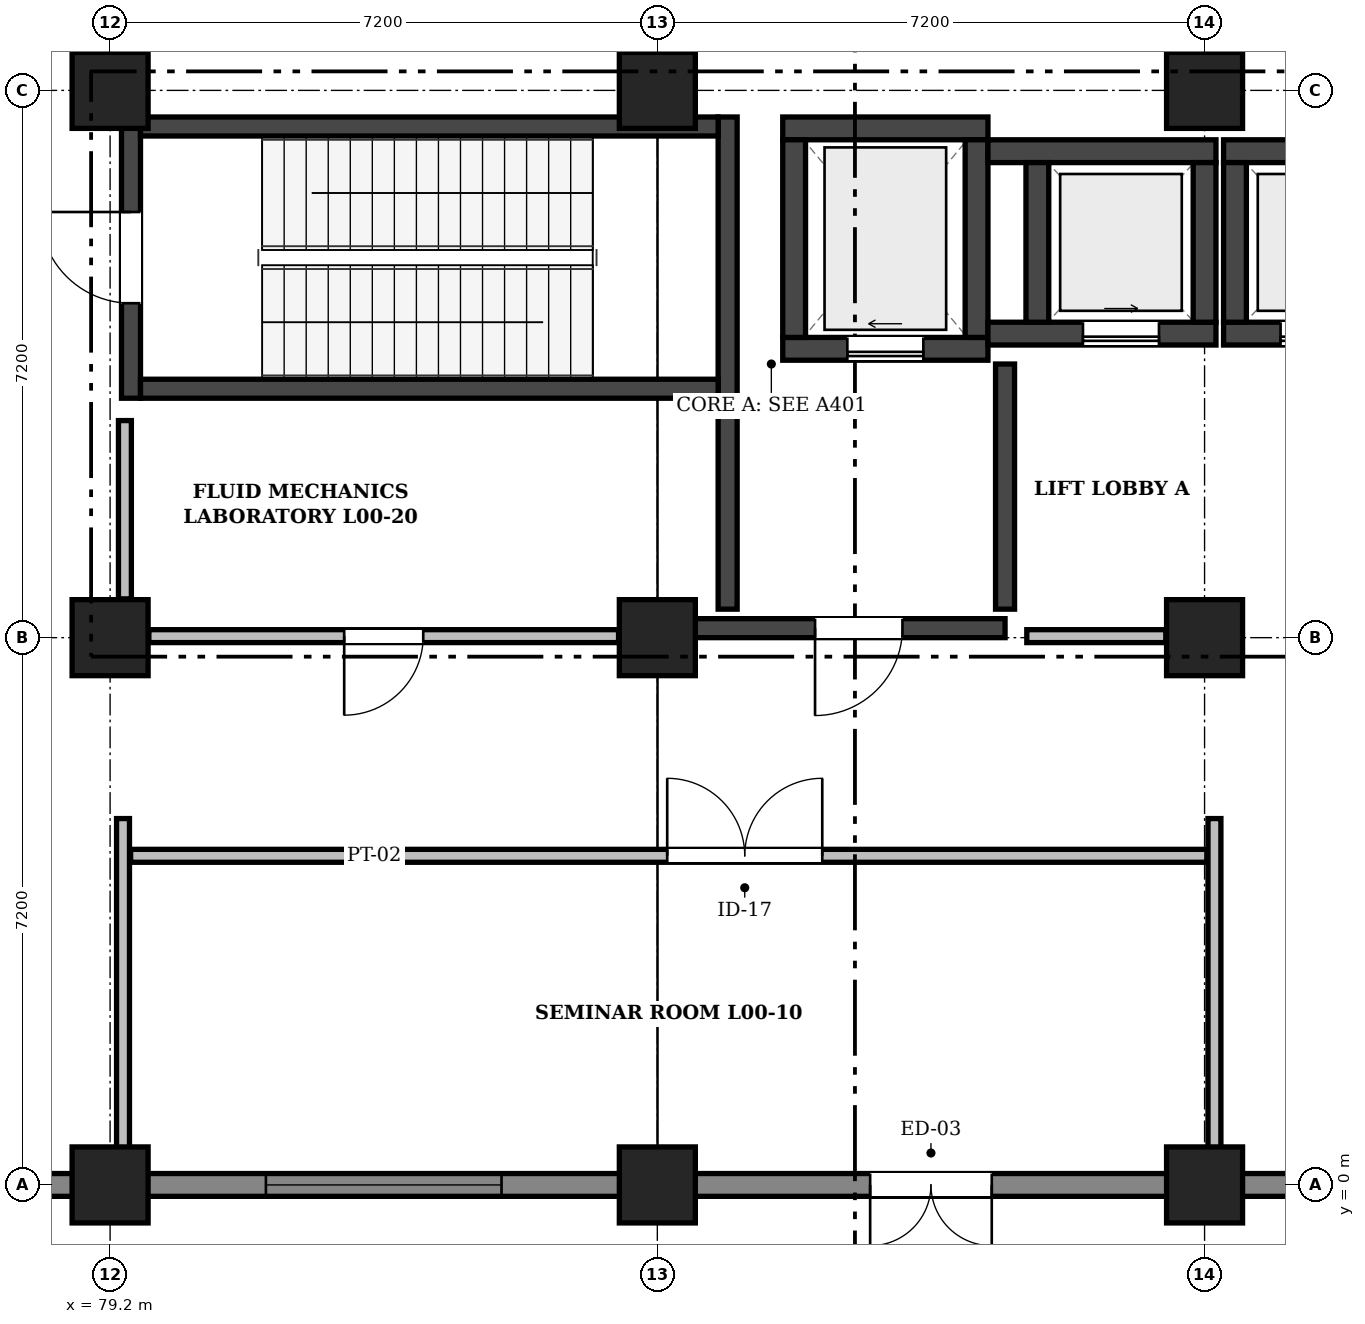
"""IFC4 building model, lengths in metres.
Left out: names, types, materials, properties, quantities, classifications, styles, units other than length and angle.
Written with IfcOpenShell. Run it as: python <this file> out.ifc"""

import sys

from ifc_helpers import new_model, si_unit, direction, frame, frame_2d, origin, origin_2d, place, context, subcontext, project, spatial, rectangle, extrude, element, fill, save


model = new_model("IFC4")
c1 = context("Model", 3, precision=1e-05, world=origin(), true_north=direction((0.0, 1.0)))
c2 = subcontext(c1, "Body", "Model", "MODEL_VIEW")
j1 = project(units=[si_unit("LENGTHUNIT", "METRE"), si_unit("PLANEANGLEUNIT", "RADIAN")], contexts=[c1])
p1 = place(None, origin())
s1 = spatial("IfcSite", under=j1, at=p1, CompositionType="ELEMENT")
p2 = place(p1, origin())
s2 = spatial("IfcBuilding", under=s1, at=p2, CompositionType="ELEMENT")
p3 = place(p2, origin())
s3 = spatial("IfcBuildingStorey", under=s2, at=p3, CompositionType="ELEMENT", Elevation=0.0)
for number, where, z_axis, x_axis in (
    (1, (79.2, 0.0, 0.0), (0.0, 0.0, 1.0), (1.0, 0.0, 0.0)),
    (2, (79.2, 7.2, 0.0), (0.0, 0.0, 1.0), (1.0, 0.0, 0.0)),
    (3, (79.2, 14.4, 0.0), (0.0, 0.0, 1.0), (1.0, 0.0, 0.0)),
    (4, (86.4, 0.0, 0.0), (0.0, 0.0, 1.0), (1.0, 0.0, 0.0)),
    (5, (86.4, 7.2, 0.0), (0.0, 0.0, 1.0), (1.0, 0.0, 0.0)),
    (6, (86.4, 14.4, 0.0), (0.0, 0.0, 1.0), (1.0, 0.0, 0.0)),
    (7, (93.6, 0.0, 0.0), (0.0, 0.0, 1.0), (1.0, 0.0, 0.0)),
    (8, (93.6, 7.2, 0.0), (0.0, 0.0, 1.0), (1.0, 0.0, 0.0)),
    (9, (93.6, 14.4, 0.0), (0.0, 0.0, 1.0), (1.0, 0.0, 0.0)),
):
    element("IfcColumn", number, at=place(p3, frame(where, z_axis=z_axis, x_axis=x_axis)), inside=s3, PredefinedType="COLUMN", context=c2, shape_type="SweptSolid", body=[
        extrude(rectangle(XDim=1.0, YDim=1.0, at=origin_2d()), origin(), (0.0, 0.0, 1.0), 4.8),
    ])
p4 = place(p3, frame((100.8, 0.0, 0.0), z_axis=(0.0, 0.0, 1.0), x_axis=(-1.0, 0.0, 0.0)))
e10 = element("IfcWall", 10, at=p4, inside=s3, PredefinedType="SOLIDWALL", context=c2, shape_type="SweptSolid", body=[
    extrude(rectangle(XDim=7.2, YDim=0.3, at=frame_2d((3.6, 0.0))), origin(), (0.0, 0.0, 1.0), 4.52),
])
p5 = place(p4, frame((2.8, 0.0, 0.0)))
e11 = element("IfcOpeningElement", 11, at=p5, cuts=e10, PredefinedType="OPENING", context=c2, shape_type="SweptSolid", body=[
    extrude(rectangle(XDim=1.6, YDim=2.2, at=frame_2d((0.8, 1.1))), frame((0.0, 0.162, 0.0), z_axis=(0.0, -1.0, 0.0), x_axis=(1.0, 0.0, 0.0)), (0.0, 0.0, 1.0), 0.324),
])
p6 = place(p3, frame((93.6, 0.0, 0.0), z_axis=(0.0, 0.0, 1.0), x_axis=(-1.0, 0.0, 0.0)))
e12 = element("IfcWall", 12, at=p6, inside=s3, PredefinedType="SOLIDWALL", context=c2, shape_type="SweptSolid", body=[
    extrude(rectangle(XDim=7.2, YDim=0.3, at=frame_2d((3.6, 0.0))), origin(), (0.0, 0.0, 1.0), 4.52),
])
p7 = place(p6, frame((2.8, 0.0, 0.0)))
e13 = element("IfcOpeningElement", 13, at=p7, cuts=e12, PredefinedType="OPENING", context=c2, shape_type="SweptSolid", body=[
    extrude(rectangle(XDim=1.6, YDim=2.2, at=frame_2d((0.8, 1.1))), frame((0.0, 0.162, 0.0), z_axis=(0.0, -1.0, 0.0), x_axis=(1.0, 0.0, 0.0)), (0.0, 0.0, 1.0), 0.324),
])
p8 = place(p3, frame((86.4, 0.0, 0.0), z_axis=(0.0, 0.0, 1.0), x_axis=(-1.0, 0.0, 0.0)))
e14 = element("IfcWall", 14, at=p8, inside=s3, PredefinedType="SOLIDWALL", context=c2, shape_type="SweptSolid", body=[
    extrude(rectangle(XDim=7.2, YDim=0.3, at=frame_2d((3.6, 0.0))), origin(), (0.0, 0.0, 1.0), 4.52),
])
p9 = place(p8, frame((2.05, 0.0, 0.95)))
e15 = element("IfcOpeningElement", 15, at=p9, cuts=e14, PredefinedType="OPENING", context=c2, shape_type="SweptSolid", body=[
    extrude(rectangle(XDim=3.1, YDim=1.55, at=frame_2d((1.55, 0.775))), frame((0.0, 0.162, 0.0), z_axis=(0.0, -1.0, 0.0), x_axis=(1.0, 0.0, 0.0)), (0.0, 0.0, 1.0), 0.324),
])
p10 = place(p3, frame((79.2, 0.0, 0.0), z_axis=(0.0, 0.0, 1.0), x_axis=(-1.0, 0.0, 0.0)))
e16 = element("IfcWall", 16, at=p10, inside=s3, PredefinedType="SOLIDWALL", context=c2, shape_type="SweptSolid", body=[
    extrude(rectangle(XDim=7.2, YDim=0.3, at=frame_2d((3.6, 0.0))), origin(), (0.0, 0.0, 1.0), 4.52),
])
p11 = place(p10, frame((2.8, 0.0, 0.0)))
e17 = element("IfcOpeningElement", 17, at=p11, cuts=e16, PredefinedType="OPENING", context=c2, shape_type="SweptSolid", body=[
    extrude(rectangle(XDim=1.6, YDim=2.2, at=frame_2d((0.8, 1.1))), frame((0.0, 0.162, 0.0), z_axis=(0.0, -1.0, 0.0), x_axis=(1.0, 0.0, 0.0)), (0.0, 0.0, 1.0), 0.324),
])
p12 = place(p3, frame((88.05, 11.0, 0.0), z_axis=(0.0, 0.0, 1.0), x_axis=(1.0, 0.0, 0.0)))
e18 = element("IfcWall", 18, at=p12, inside=s3, PredefinedType="SHEAR", context=c2, shape_type="SweptSolid", body=[
    extrude(rectangle(XDim=2.7, YDim=0.3, at=frame_2d((1.35, 0.0))), origin(), (0.0, 0.0, 1.0), 4.55),
])
p13 = place(p12, frame((0.85, 0.0, 0.0)))
e19 = element("IfcOpeningElement", 19, at=p13, cuts=e18, PredefinedType="OPENING", context=c2, shape_type="SweptSolid", body=[
    extrude(rectangle(XDim=1.0, YDim=2.1, at=frame_2d((0.5, 1.05))), frame((0.0, 0.162, 0.0), z_axis=(0.0, -1.0, 0.0), x_axis=(1.0, 0.0, 0.0)), (0.0, 0.0, 1.0), 0.324),
])
p14 = place(p3, frame((88.05, 13.9, 0.0), z_axis=(0.0, 0.0, 1.0), x_axis=(1.0, 0.0, 0.0)))
e20 = element("IfcWall", 20, at=p14, inside=s3, PredefinedType="SHEAR", context=c2, shape_type="SweptSolid", body=[
    extrude(rectangle(XDim=2.7, YDim=0.3, at=frame_2d((1.35, 0.0))), origin(), (0.0, 0.0, 1.0), 4.55),
])
for number, where, z_axis, x_axis in (
    (21, (88.2, 11.15, 0.0), (0.0, 0.0, 1.0), (0.0, 1.0, 0.0)),
    (22, (90.6, 11.15, 0.0), (0.0, 0.0, 1.0), (0.0, 1.0, 0.0)),
):
    element("IfcWall", number, at=place(p3, frame(where, z_axis=z_axis, x_axis=x_axis)), inside=s3, PredefinedType="SHEAR", context=c2, shape_type="SweptSolid", body=[
        extrude(rectangle(XDim=2.6, YDim=0.3, at=frame_2d((1.3, 0.0))), origin(), (0.0, 0.0, 1.0), 4.55),
    ])
p15 = place(p3, frame((90.75, 11.2, 0.0), z_axis=(0.0, 0.0, 1.0), x_axis=(1.0, 0.0, 0.0)))
e23 = element("IfcWall", 23, at=p15, inside=s3, PredefinedType="SHEAR", context=c2, shape_type="SweptSolid", body=[
    extrude(rectangle(XDim=3.0, YDim=0.3, at=frame_2d((1.5, 0.0))), origin(), (0.0, 0.0, 1.0), 4.55),
])
p16 = place(p15, frame((1.25, 0.0, 0.0)))
e24 = element("IfcOpeningElement", 24, at=p16, cuts=e23, PredefinedType="OPENING", context=c2, shape_type="SweptSolid", body=[
    extrude(rectangle(XDim=1.0, YDim=2.1, at=frame_2d((0.5, 1.05))), frame((0.0, 0.162, 0.0), z_axis=(0.0, -1.0, 0.0), x_axis=(1.0, 0.0, 0.0)), (0.0, 0.0, 1.0), 0.324),
])
p17 = place(p3, frame((90.75, 13.6, 0.0), z_axis=(0.0, 0.0, 1.0), x_axis=(1.0, 0.0, 0.0)))
e25 = element("IfcWall", 25, at=p17, inside=s3, PredefinedType="SHEAR", context=c2, shape_type="SweptSolid", body=[
    extrude(rectangle(XDim=3.0, YDim=0.3, at=frame_2d((1.5, 0.0))), origin(), (0.0, 0.0, 1.0), 4.55),
])
for number, where, z_axis, x_axis in (
    (26, (91.4, 11.35, 0.0), (0.0, 0.0, 1.0), (0.0, 1.0, 0.0)),
    (27, (93.6, 11.35, 0.0), (0.0, 0.0, 1.0), (0.0, 1.0, 0.0)),
):
    element("IfcWall", number, at=place(p3, frame(where, z_axis=z_axis, x_axis=x_axis)), inside=s3, PredefinedType="SHEAR", context=c2, shape_type="SweptSolid", body=[
        extrude(rectangle(XDim=2.1, YDim=0.3, at=frame_2d((1.05, 0.0))), origin(), (0.0, 0.0, 1.0), 4.55),
    ])
p18 = place(p3, frame((93.85, 11.2, 0.0), z_axis=(0.0, 0.0, 1.0), x_axis=(1.0, 0.0, 0.0)))
e28 = element("IfcWall", 28, at=p18, inside=s3, PredefinedType="SHEAR", context=c2, shape_type="SweptSolid", body=[
    extrude(rectangle(XDim=2.5, YDim=0.3, at=frame_2d((1.25, 0.0))), origin(), (0.0, 0.0, 1.0), 4.55),
])
p19 = place(p18, frame((0.75, 0.0, 0.0)))
e29 = element("IfcOpeningElement", 29, at=p19, cuts=e28, PredefinedType="OPENING", context=c2, shape_type="SweptSolid", body=[
    extrude(rectangle(XDim=1.0, YDim=2.1, at=frame_2d((0.5, 1.05))), frame((0.0, 0.162, 0.0), z_axis=(0.0, -1.0, 0.0), x_axis=(1.0, 0.0, 0.0)), (0.0, 0.0, 1.0), 0.324),
])
p20 = place(p3, frame((93.85, 13.6, 0.0), z_axis=(0.0, 0.0, 1.0), x_axis=(1.0, 0.0, 0.0)))
e30 = element("IfcWall", 30, at=p20, inside=s3, PredefinedType="SHEAR", context=c2, shape_type="SweptSolid", body=[
    extrude(rectangle(XDim=2.5, YDim=0.3, at=frame_2d((1.25, 0.0))), origin(), (0.0, 0.0, 1.0), 4.55),
])
p21 = place(p3, frame((94.0, 11.35, 0.0), z_axis=(0.0, 0.0, 1.0), x_axis=(0.0, 1.0, 0.0)))
e31 = element("IfcWall", 31, at=p21, inside=s3, PredefinedType="SHEAR", context=c2, shape_type="SweptSolid", body=[
    extrude(rectangle(XDim=2.1, YDim=0.3, at=frame_2d((1.05, 0.0))), origin(), (0.0, 0.0, 1.0), 4.55),
])
p22 = place(p3, frame((79.475, 10.35, 0.0), z_axis=(0.0, 0.0, 1.0), x_axis=(0.0, 1.0, 0.0)))
e32 = element("IfcWall", 32, at=p22, inside=s3, PredefinedType="SHEAR", context=c2, shape_type="SweptSolid", body=[
    extrude(rectangle(XDim=3.7, YDim=0.25, at=frame_2d((1.85, 0.0))), origin(), (0.0, 0.0, 1.0), 4.55),
])
p23 = place(p22, frame((1.25, 0.0, 0.0)))
e33 = element("IfcOpeningElement", 33, at=p23, cuts=e32, PredefinedType="OPENING", context=c2, shape_type="SweptSolid", body=[
    extrude(rectangle(XDim=1.2, YDim=2.15, at=frame_2d((0.6, 1.075))), frame((0.0, 0.137, 0.0), z_axis=(0.0, -1.0, 0.0), x_axis=(1.0, 0.0, 0.0)), (0.0, 0.0, 1.0), 0.274),
])
p24 = place(p3, frame((87.325, 10.35, 0.0), z_axis=(0.0, 0.0, 1.0), x_axis=(0.0, 1.0, 0.0)))
e34 = element("IfcWall", 34, at=p24, inside=s3, PredefinedType="SHEAR", context=c2, shape_type="SweptSolid", body=[
    extrude(rectangle(XDim=3.7, YDim=0.25, at=frame_2d((1.85, 0.0))), origin(), (0.0, 0.0, 1.0), 4.55),
])
for number, where, z_axis, x_axis in (
    (35, (79.6, 10.475, 0.0), (0.0, 0.0, 1.0), (1.0, 0.0, 0.0)),
    (36, (79.6, 13.925, 0.0), (0.0, 0.0, 1.0), (1.0, 0.0, 0.0)),
):
    element("IfcWall", number, at=place(p3, frame(where, z_axis=z_axis, x_axis=x_axis)), inside=s3, PredefinedType="SHEAR", context=c2, shape_type="SweptSolid", body=[
        extrude(rectangle(XDim=7.6, YDim=0.25, at=frame_2d((3.8, 0.0))), origin(), (0.0, 0.0, 1.0), 4.55),
    ])
p25 = place(p3, frame((86.9, 7.325, 0.0), z_axis=(0.0, 0.0, 1.0), x_axis=(1.0, 0.0, 0.0)))
e37 = element("IfcWall", 37, at=p25, inside=s3, PredefinedType="SHEAR", context=c2, shape_type="SweptSolid", body=[
    extrude(rectangle(XDim=4.075, YDim=0.25, at=frame_2d((2.038, 0.0))), origin(), (0.0, 0.0, 1.0), 4.55),
])
p26 = place(p25, frame((1.575, 0.0, 0.0)))
e38 = element("IfcOpeningElement", 38, at=p26, cuts=e37, PredefinedType="OPENING", context=c2, shape_type="SweptSolid", body=[
    extrude(rectangle(XDim=1.15, YDim=2.15, at=frame_2d((0.575, 1.075))), frame((0.0, 0.137, 0.0), z_axis=(0.0, -1.0, 0.0), x_axis=(1.0, 0.0, 0.0)), (0.0, 0.0, 1.0), 0.274),
])
p27 = place(p3, frame((87.325, 7.575, 0.0), z_axis=(0.0, 0.0, 1.0), x_axis=(0.0, 1.0, 0.0)))
e39 = element("IfcWall", 39, at=p27, inside=s3, PredefinedType="SHEAR", context=c2, shape_type="SweptSolid", body=[
    extrude(rectangle(XDim=2.77, YDim=0.25, at=frame_2d((1.385, 0.0))), origin(), (0.0, 0.0, 1.0), 4.55),
])
p28 = place(p3, frame((90.975, 7.575, 0.0), z_axis=(0.0, 0.0, 1.0), x_axis=(0.0, 1.0, 0.0)))
e40 = element("IfcWall", 40, at=p28, inside=s3, PredefinedType="SHEAR", context=c2, shape_type="SweptSolid", body=[
    extrude(rectangle(XDim=3.225, YDim=0.25, at=frame_2d((1.613, 0.0))), origin(), (0.0, 0.0, 1.0), 4.55),
])
p29 = place(p3, frame((79.37, 0.162, 0.0), z_axis=(0.0, 0.0, 1.0), x_axis=(0.0, 1.0, 0.0)))
e41 = element("IfcWall", 41, at=p29, inside=s3, PredefinedType="PARTITIONING", context=c2, shape_type="SweptSolid", body=[
    extrude(rectangle(XDim=4.658, YDim=0.17, at=frame_2d((2.329, 0.0))), origin(), (0.0, 0.0, 1.0), 4.08),
])
p30 = place(p3, frame((79.395, 7.71, 0.0), z_axis=(0.0, 0.0, 1.0), x_axis=(0.0, 1.0, 0.0)))
e42 = element("IfcWall", 42, at=p30, inside=s3, PredefinedType="PARTITIONING", context=c2, shape_type="SweptSolid", body=[
    extrude(rectangle(XDim=2.346, YDim=0.17, at=frame_2d((1.173, 0.0))), origin(), (0.0, 0.0, 1.0), 4.08),
])
p31 = place(p3, frame((93.73, 0.162, 0.0), z_axis=(0.0, 0.0, 1.0), x_axis=(0.0, 1.0, 0.0)))
e43 = element("IfcWall", 43, at=p31, inside=s3, PredefinedType="PARTITIONING", context=c2, shape_type="SweptSolid", body=[
    extrude(rectangle(XDim=4.658, YDim=0.17, at=frame_2d((2.329, 0.0))), origin(), (0.0, 0.0, 1.0), 4.08),
])
p32 = place(p3, frame((79.47, 4.33, 0.0), z_axis=(0.0, 0.0, 1.0), x_axis=(1.0, 0.0, 0.0)))
e44 = element("IfcWall", 44, at=p32, inside=s3, PredefinedType="PARTITIONING", context=c2, shape_type="SweptSolid", body=[
    extrude(rectangle(XDim=14.16, YDim=0.17, at=frame_2d((7.08, 0.0))), origin(), (0.0, 0.0, 1.0), 4.46),
])
p33 = place(p32, frame((7.06, 0.0, 0.0)))
e45 = element("IfcOpeningElement", 45, at=p33, cuts=e44, PredefinedType="OPENING", context=c2, shape_type="SweptSolid", body=[
    extrude(rectangle(XDim=2.04, YDim=2.34, at=frame_2d((1.02, 1.17))), frame((0.0, 0.097, 0.0), z_axis=(0.0, -1.0, 0.0), x_axis=(1.0, 0.0, 0.0)), (0.0, 0.0, 1.0), 0.194),
])
p34 = place(p3, frame((79.71, 7.22, 0.0), z_axis=(0.0, 0.0, 1.0), x_axis=(1.0, 0.0, 0.0)))
e46 = element("IfcWall", 46, at=p34, inside=s3, PredefinedType="PARTITIONING", context=c2, shape_type="SweptSolid", body=[
    extrude(rectangle(XDim=6.18, YDim=0.17, at=frame_2d((3.09, 0.0))), origin(), (0.0, 0.0, 1.0), 3.83),
])
p35 = place(p34, frame((2.57, 0.0, 0.0)))
e47 = element("IfcOpeningElement", 47, at=p35, cuts=e46, PredefinedType="OPENING", context=c2, shape_type="SweptSolid", body=[
    extrude(rectangle(XDim=1.04, YDim=2.18, at=frame_2d((0.52, 1.09))), frame((0.0, 0.097, 0.0), z_axis=(0.0, -1.0, 0.0), x_axis=(1.0, 0.0, 0.0)), (0.0, 0.0, 1.0), 0.194),
])
p36 = place(p3, frame((91.261, 7.22, 0.0), z_axis=(0.0, 0.0, 1.0), x_axis=(1.0, 0.0, 0.0)))
e48 = element("IfcWall", 48, at=p36, inside=s3, PredefinedType="PARTITIONING", context=c2, shape_type="SweptSolid", body=[
    extrude(rectangle(XDim=1.829, YDim=0.17, at=frame_2d((0.915, 0.0))), origin(), (0.0, 0.0, 1.0), 3.83),
])
p37 = place(p7, origin())
e49 = element("IfcDoor", 49, at=p37, inside=s3, OperationType="DOUBLE_DOOR_SINGLE_SWING", PredefinedType="DOOR", context=c2, shape_type="SweptSolid", body=[
    extrude(rectangle(XDim=1.6, YDim=2.2, at=frame_2d((0.8, 1.1))), frame((0.0, 0.025, 0.0), z_axis=(0.0, -1.0, 0.0), x_axis=(1.0, 0.0, 0.0)), (0.0, 0.0, 1.0), 0.05),
])
fill(e13, e49)
p38 = place(p9, origin())
e50 = element("IfcWindow", 50, at=p38, inside=s3, PartitioningType="SINGLE_PANEL", PredefinedType="WINDOW", context=c2, shape_type="SweptSolid", body=[
    extrude(rectangle(XDim=3.1, YDim=1.55, at=frame_2d((1.55, 0.775))), frame((0.0, 0.03, 0.0), z_axis=(0.0, -1.0, 0.0), x_axis=(1.0, 0.0, 0.0)), (0.0, 0.0, 1.0), 0.06),
])
fill(e15, e50)
p39 = place(p13, frame((1.0, 0.0, 0.0), z_axis=(0.0, 0.0, 1.0), x_axis=(-1.0, 0.0, 0.0)))
e51 = element("IfcDoor", 51, at=p39, inside=s3, OperationType="SLIDING_TO_LEFT", PredefinedType="DOOR", context=c2, shape_type="SweptSolid", body=[
    extrude(rectangle(XDim=1.0, YDim=2.1, at=frame_2d((0.5, 1.05))), frame((0.0, 0.025, 0.0), z_axis=(0.0, -1.0, 0.0), x_axis=(1.0, 0.0, 0.0)), (0.0, 0.0, 1.0), 0.05),
])
fill(e19, e51)
p40 = place(p16, frame((1.0, 0.0, 0.0), z_axis=(0.0, 0.0, 1.0), x_axis=(-1.0, 0.0, 0.0)))
e52 = element("IfcDoor", 52, at=p40, inside=s3, OperationType="SLIDING_TO_RIGHT", PredefinedType="DOOR", context=c2, shape_type="SweptSolid", body=[
    extrude(rectangle(XDim=1.0, YDim=2.1, at=frame_2d((0.5, 1.05))), frame((0.0, 0.025, 0.0), z_axis=(0.0, -1.0, 0.0), x_axis=(1.0, 0.0, 0.0)), (0.0, 0.0, 1.0), 0.05),
])
fill(e24, e52)
p41 = place(p19, frame((1.0, 0.0, 0.0), z_axis=(0.0, 0.0, 1.0), x_axis=(-1.0, 0.0, 0.0)))
e53 = element("IfcDoor", 53, at=p41, inside=s3, OperationType="SLIDING_TO_LEFT", PredefinedType="DOOR", context=c2, shape_type="SweptSolid", body=[
    extrude(rectangle(XDim=1.0, YDim=2.1, at=frame_2d((0.5, 1.05))), frame((0.0, 0.025, 0.0), z_axis=(0.0, -1.0, 0.0), x_axis=(1.0, 0.0, 0.0)), (0.0, 0.0, 1.0), 0.05),
])
fill(e29, e53)
p42 = place(p23, origin())
e54 = element("IfcDoor", 54, at=p42, inside=s3, OperationType="SINGLE_SWING_RIGHT", PredefinedType="DOOR", context=c2, shape_type="SweptSolid", body=[
    extrude(rectangle(XDim=1.2, YDim=2.15, at=frame_2d((0.6, 1.075))), frame((0.0, 0.025, 0.0), z_axis=(0.0, -1.0, 0.0), x_axis=(1.0, 0.0, 0.0)), (0.0, 0.0, 1.0), 0.05),
])
fill(e33, e54)
p43 = place(p26, frame((1.15, 0.0, 0.0), z_axis=(0.0, 0.0, 1.0), x_axis=(-1.0, 0.0, 0.0)))
e55 = element("IfcDoor", 55, at=p43, inside=s3, OperationType="SINGLE_SWING_RIGHT", PredefinedType="DOOR", context=c2, shape_type="SweptSolid", body=[
    extrude(rectangle(XDim=1.15, YDim=2.15, at=frame_2d((0.575, 1.075))), frame((0.0, 0.025, 0.0), z_axis=(0.0, -1.0, 0.0), x_axis=(1.0, 0.0, 0.0)), (0.0, 0.0, 1.0), 0.05),
])
fill(e38, e55)
p44 = place(p33, origin())
e56 = element("IfcDoor", 56, at=p44, inside=s3, OperationType="DOUBLE_DOOR_SINGLE_SWING", PredefinedType="DOOR", context=c2, shape_type="SweptSolid", body=[
    extrude(rectangle(XDim=2.04, YDim=2.34, at=frame_2d((1.02, 1.17))), frame((0.0, 0.025, 0.0), z_axis=(0.0, -1.0, 0.0), x_axis=(1.0, 0.0, 0.0)), (0.0, 0.0, 1.0), 0.05),
])
fill(e45, e56)
p45 = place(p35, frame((1.04, 0.0, 0.0), z_axis=(0.0, 0.0, 1.0), x_axis=(-1.0, 0.0, 0.0)))
e57 = element("IfcDoor", 57, at=p45, inside=s3, OperationType="SINGLE_SWING_RIGHT", PredefinedType="DOOR", context=c2, shape_type="SweptSolid", body=[
    extrude(rectangle(XDim=1.04, YDim=2.18, at=frame_2d((0.52, 1.09))), frame((0.0, 0.025, 0.0), z_axis=(0.0, -1.0, 0.0), x_axis=(1.0, 0.0, 0.0)), (0.0, 0.0, 1.0), 0.05),
])
fill(e47, e57)
save(model, sys.argv[1])
